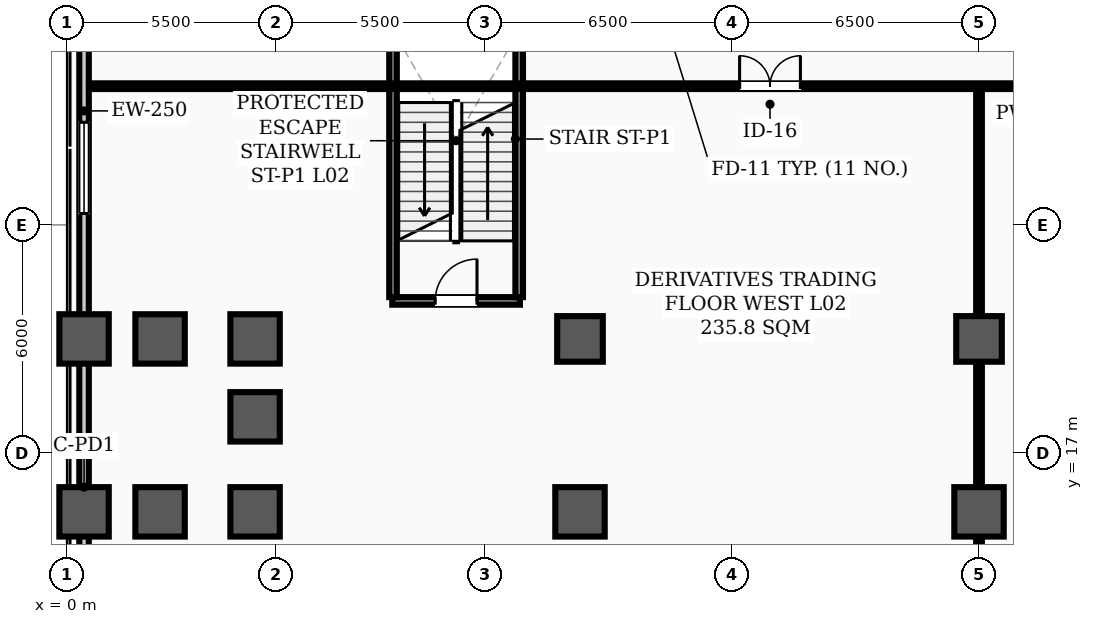
"""IFC4 building model, lengths in metres.
Left out: names, types, materials, properties, quantities, classifications, styles, units other than length and angle.
Written with IfcOpenShell. Run it as: python <this file> out.ifc"""

import sys

from ifc_helpers import new_model, si_unit, direction, frame, frame_2d, origin, origin_2d, place, context, subcontext, project, spatial, rectangle, hollow_rectangle, extrude, element, fill, save


model = new_model("IFC4")
c1 = context("Model", 3, precision=1e-05, world=origin(), true_north=direction((0.0, 1.0)))
c2 = subcontext(c1, "Body", "Model", "MODEL_VIEW")
j1 = project(units=[si_unit("LENGTHUNIT", "METRE"), si_unit("PLANEANGLEUNIT", "RADIAN")], contexts=[c1])
p1 = place(None, origin())
s1 = spatial("IfcSite", under=j1, at=p1, CompositionType="ELEMENT")
p2 = place(p1, origin())
s2 = spatial("IfcBuilding", under=s1, at=p2, CompositionType="ELEMENT")
p3 = place(p2, frame((0.0, 0.0, 5.8)))
s3 = spatial("IfcBuildingStorey", under=s2, at=p3, CompositionType="ELEMENT", Elevation=5.8)
for number, where, z_axis, x_axis in (
    (1, (13.5, 20.0, 0.0), (0.0, 0.0, 1.0), (1.0, 0.0, 0.0)),
    (2, (24.0, 20.0, 0.0), (0.0, 0.0, 1.0), (1.0, 0.0, 0.0)),
):
    element("IfcColumn", number, at=place(p3, frame(where, z_axis=z_axis, x_axis=x_axis)), inside=s3, PredefinedType="COLUMN", context=c2, shape_type="SweptSolid", body=[
        extrude(hollow_rectangle(XDim=1.2, YDim=1.2, WallThickness=0.04, InnerFilletRadius=0.02, OuterFilletRadius=0.06, at=origin_2d()), origin(), (0.0, 0.0, 1.0), 5.4),
    ])
for number, where, z_axis, x_axis in (
    (3, (0.45, 15.45, 0.0), (0.0, 0.0, 1.0), (1.0, 0.0, 0.0)),
    (4, (0.45, 20.0, 0.0), (0.0, 0.0, 1.0), (1.0, 0.0, 0.0)),
    (5, (2.45, 15.45, 0.0), (0.0, 0.0, 1.0), (1.0, 0.0, 0.0)),
    (6, (2.45, 20.0, 0.0), (0.0, 0.0, 1.0), (1.0, 0.0, 0.0)),
    (7, (4.95, 15.45, 0.0), (0.0, 0.0, 1.0), (1.0, 0.0, 0.0)),
    (8, (4.95, 17.95, 0.0), (0.0, 0.0, 1.0), (1.0, 0.0, 0.0)),
    (9, (4.95, 20.0, 0.0), (0.0, 0.0, 1.0), (1.0, 0.0, 0.0)),
    (10, (13.5, 15.45, 0.0), (0.0, 0.0, 1.0), (1.0, 0.0, 0.0)),
    (11, (24.0, 15.45, 0.0), (0.0, 0.0, 1.0), (1.0, 0.0, 0.0)),
):
    element("IfcColumn", number, at=place(p3, frame(where, z_axis=z_axis, x_axis=x_axis)), inside=s3, PredefinedType="COLUMN", context=c2, shape_type="SweptSolid", body=[
        extrude(rectangle(XDim=1.3, YDim=1.3, at=origin_2d()), origin(), (0.0, 0.0, 1.0), 5.4),
    ])
p4 = place(p3, frame((0.45, 3.45, 0.0), z_axis=(0.0, 0.0, 1.0), x_axis=(0.0, 1.0, 0.0)))
e12 = element("IfcWall", 12, at=p4, inside=s3, PredefinedType="STANDARD", context=c2, shape_type="SweptSolid", body=[
    extrude(rectangle(XDim=45.1, YDim=0.25, at=frame_2d((22.55, 0.0))), origin(), (0.0, 0.0, 1.0), 4.37),
])
p5 = place(p4, frame((4.8, 0.0, 0.9)))
e13 = element("IfcOpeningElement", 13, at=p5, cuts=e12, PredefinedType="OPENING", context=c2, shape_type="SweptSolid", body=[
    extrude(rectangle(XDim=2.4, YDim=2.1, at=frame_2d((1.2, 1.05))), frame((0.0, 0.135, 0.0), z_axis=(0.0, -1.0, 0.0), x_axis=(1.0, 0.0, 0.0)), (0.0, 0.0, 1.0), 0.27),
])
p6 = place(p4, frame((19.85, 0.0, 0.9)))
e14 = element("IfcOpeningElement", 14, at=p6, cuts=e12, PredefinedType="OPENING", context=c2, shape_type="SweptSolid", body=[
    extrude(rectangle(XDim=2.4, YDim=2.1, at=frame_2d((1.2, 1.05))), frame((0.0, 0.135, 0.0), z_axis=(0.0, -1.0, 0.0), x_axis=(1.0, 0.0, 0.0)), (0.0, 0.0, 1.0), 0.27),
])
p7 = place(p4, frame((29.0, 0.0, 0.9)))
e15 = element("IfcOpeningElement", 15, at=p7, cuts=e12, PredefinedType="OPENING", context=c2, shape_type="SweptSolid", body=[
    extrude(rectangle(XDim=2.4, YDim=2.1, at=frame_2d((1.2, 1.05))), frame((0.0, 0.135, 0.0), z_axis=(0.0, -1.0, 0.0), x_axis=(1.0, 0.0, 0.0)), (0.0, 0.0, 1.0), 0.27),
])
p8 = place(p4, frame((36.75, 0.0, 0.9)))
e16 = element("IfcOpeningElement", 16, at=p8, cuts=e12, PredefinedType="OPENING", context=c2, shape_type="SweptSolid", body=[
    extrude(rectangle(XDim=2.4, YDim=2.1, at=frame_2d((1.2, 1.05))), frame((0.0, 0.135, 0.0), z_axis=(0.0, -1.0, 0.0), x_axis=(1.0, 0.0, 0.0)), (0.0, 0.0, 1.0), 0.27),
])
p9 = place(p3, frame((8.56, 21.0, 0.0), z_axis=(0.0, 0.0, 1.0), x_axis=(1.0, 0.0, 0.0)))
e17 = element("IfcWall", 17, at=p9, inside=s3, PredefinedType="STANDARD", context=c2, shape_type="SweptSolid", body=[
    extrude(rectangle(XDim=3.36, YDim=0.2, at=frame_2d((1.68, 0.0))), origin(), (0.0, 0.0, 1.0), 5.15),
])
p10 = place(p9, frame((1.13, 0.0, 0.0)))
e18 = element("IfcOpeningElement", 18, at=p10, cuts=e17, PredefinedType="OPENING", context=c2, shape_type="SweptSolid", body=[
    extrude(rectangle(XDim=1.1, YDim=2.08, at=frame_2d((0.55, 1.04))), frame((0.0, 0.11, 0.0), z_axis=(0.0, -1.0, 0.0), x_axis=(1.0, 0.0, 0.0)), (0.0, 0.0, 1.0), 0.22),
])
for number, where, z_axis, x_axis in (
    (19, (8.58, 21.1, 0.0), (0.0, 0.0, 1.0), (0.0, 1.0, 0.0)),
    (20, (11.9, 21.1, 0.0), (0.0, 0.0, 1.0), (0.0, 1.0, 0.0)),
):
    element("IfcWall", number, at=place(p3, frame(where, z_axis=z_axis, x_axis=x_axis)), inside=s3, PredefinedType="STANDARD", context=c2, shape_type="SweptSolid", body=[
        extrude(rectangle(XDim=6.84, YDim=0.2, at=frame_2d((3.42, 0.0))), origin(), (0.0, 0.0, 1.0), 5.15),
    ])
p11 = place(p3, frame((0.58, 26.65, 0.0), z_axis=(0.0, 0.0, 1.0), x_axis=(1.0, 0.0, 0.0)))
e21 = element("IfcWall", 21, at=p11, inside=s3, PredefinedType="PARTITIONING", context=c2, shape_type="SweptSolid", body=[
    extrude(rectangle(XDim=53.89, YDim=0.15, at=frame_2d((26.945, 0.0))), origin(), (0.0, 0.0, 1.0), 4.43),
])
p12 = place(p11, frame((17.12, 0.0, 0.0)))
e22 = element("IfcOpeningElement", 22, at=p12, cuts=e21, PredefinedType="OPENING", context=c2, shape_type="SweptSolid", body=[
    extrude(rectangle(XDim=1.6, YDim=2.08, at=frame_2d((0.8, 1.04))), frame((0.0, 0.085, 0.0), z_axis=(0.0, -1.0, 0.0), x_axis=(1.0, 0.0, 0.0)), (0.0, 0.0, 1.0), 0.17),
])
p13 = place(p11, frame((32.87, 0.0, 0.0)))
e23 = element("IfcOpeningElement", 23, at=p13, cuts=e21, PredefinedType="OPENING", context=c2, shape_type="SweptSolid", body=[
    extrude(rectangle(XDim=1.6, YDim=2.08, at=frame_2d((0.8, 1.04))), frame((0.0, 0.085, 0.0), z_axis=(0.0, -1.0, 0.0), x_axis=(1.0, 0.0, 0.0)), (0.0, 0.0, 1.0), 0.17),
])
p14 = place(p11, frame((45.62, 0.0, 0.0)))
e24 = element("IfcOpeningElement", 24, at=p14, cuts=e21, PredefinedType="OPENING", context=c2, shape_type="SweptSolid", body=[
    extrude(rectangle(XDim=1.6, YDim=2.08, at=frame_2d((0.8, 1.04))), frame((0.0, 0.085, 0.0), z_axis=(0.0, -1.0, 0.0), x_axis=(1.0, 0.0, 0.0)), (0.0, 0.0, 1.0), 0.17),
])
p15 = place(p3, frame((24.0, 3.53, 0.0), z_axis=(0.0, 0.0, 1.0), x_axis=(0.0, 1.0, 0.0)))
e25 = element("IfcWall", 25, at=p15, inside=s3, PredefinedType="PARTITIONING", context=c2, shape_type="SweptSolid", body=[
    extrude(rectangle(XDim=23.035, YDim=0.15, at=frame_2d((11.518, 0.0))), origin(), (0.0, 0.0, 1.0), 4.33),
])
p16 = place(p6, origin())
e26 = element("IfcWindow", 26, at=p16, inside=s3, PartitioningType="SINGLE_PANEL", PredefinedType="WINDOW", context=c2, shape_type="SweptSolid", body=[
    extrude(rectangle(XDim=2.4, YDim=2.1, at=frame_2d((1.2, 1.05))), frame((0.0, 0.03, 0.0), z_axis=(0.0, -1.0, 0.0), x_axis=(1.0, 0.0, 0.0)), (0.0, 0.0, 1.0), 0.06),
])
fill(e14, e26)
p17 = place(p10, origin())
e27 = element("IfcDoor", 27, at=p17, inside=s3, OperationType="SINGLE_SWING_RIGHT", PredefinedType="DOOR", context=c2, shape_type="SweptSolid", body=[
    extrude(rectangle(XDim=1.1, YDim=2.08, at=frame_2d((0.55, 1.04))), frame((0.0, 0.025, 0.0), z_axis=(0.0, -1.0, 0.0), x_axis=(1.0, 0.0, 0.0)), (0.0, 0.0, 1.0), 0.05),
])
fill(e18, e27)
p18 = place(p12, origin())
e28 = element("IfcDoor", 28, at=p18, inside=s3, OperationType="DOUBLE_DOOR_SINGLE_SWING", PredefinedType="DOOR", context=c2, shape_type="SweptSolid", body=[
    extrude(rectangle(XDim=1.6, YDim=2.08, at=frame_2d((0.8, 1.04))), frame((0.0, 0.025, 0.0), z_axis=(0.0, -1.0, 0.0), x_axis=(1.0, 0.0, 0.0)), (0.0, 0.0, 1.0), 0.05),
])
fill(e22, e28)
save(model, sys.argv[1])
